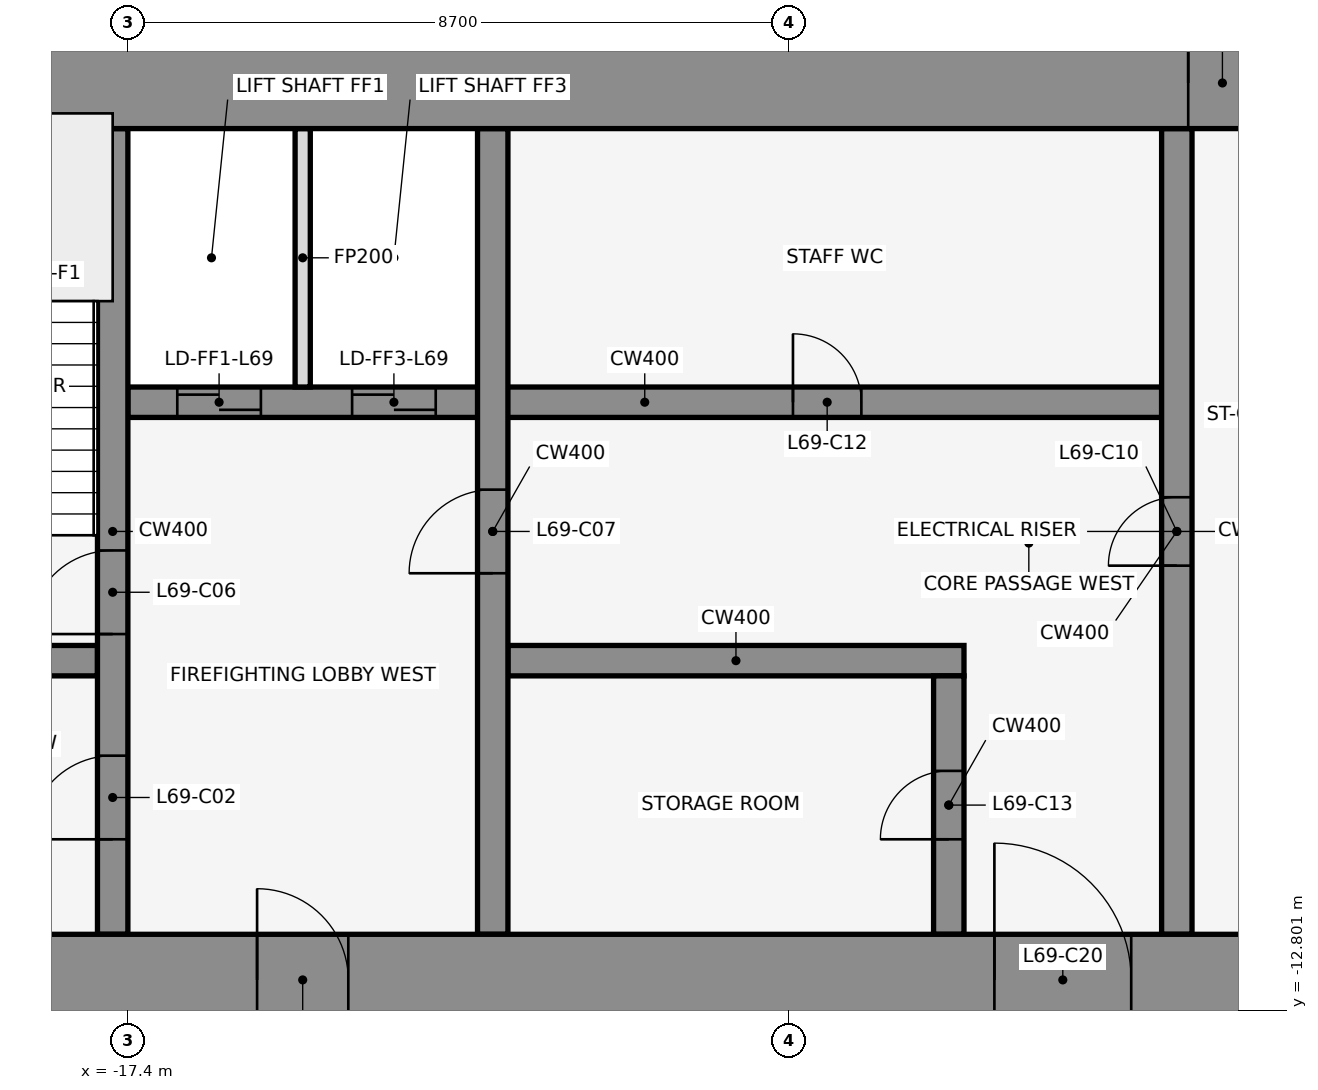
"""IFC4 building model, lengths in metres.
Left out: names, types, materials, properties, quantities, classifications, styles, units other than length and angle.
Written with IfcOpenShell. Run it as: python <this file> out.ifc"""

import sys

from ifc_helpers import new_model, si_unit, direction, frame, frame_2d, origin, place, context, subcontext, project, spatial, rectangle, extrude, element, fill, save


model = new_model("IFC4")
c1 = context("Model", 3, precision=1e-05, world=origin(), true_north=direction((0.0, 1.0)))
c2 = subcontext(c1, "Body", "Model", "MODEL_VIEW")
j1 = project(units=[si_unit("LENGTHUNIT", "METRE"), si_unit("PLANEANGLEUNIT", "RADIAN")], contexts=[c1])
p1 = place(None, origin())
s1 = spatial("IfcSite", under=j1, at=p1, CompositionType="ELEMENT")
p2 = place(p1, origin())
s2 = spatial("IfcBuilding", under=s1, at=p2, CompositionType="ELEMENT")
p3 = place(p2, frame((0.0, 0.0, 306.5)))
s3 = spatial("IfcBuildingStorey", under=s2, at=p3, CompositionType="ELEMENT", Elevation=306.5)
p4 = place(p3, frame((-14.599, 1.08, 0.0), z_axis=(0.0, 0.0, 1.0), x_axis=(-0.83981312244, -0.542875602121, 0.0)))
e1 = element("IfcWall", 1, at=p4, inside=s3, PredefinedType="STANDARD", context=c2, shape_type="SweptSolid", body=[
    extrude(rectangle(XDim=2.183, YDim=0.25, at=frame_2d((1.091, 0.0))), origin(), (0.0, 0.0, 1.0), 4.35),
])
p5 = place(p3, frame((-20.8, -8.2, 0.0), z_axis=(0.0, 0.0, 1.0), x_axis=(1.0, 0.0, 0.0)))
e2 = element("IfcWall", 2, at=p5, inside=s3, PredefinedType="SHEAR", context=c2, shape_type="SweptSolid", body=[
    extrude(rectangle(XDim=3.0, YDim=0.4, at=frame_2d((1.5, 0.0))), origin(), (0.0, 0.0, 1.0), 4.5),
])
p6 = place(p5, frame((0.85, 0.0, 0.0)))
e3 = element("IfcOpeningElement", 3, at=p6, cuts=e2, PredefinedType="OPENING", context=c2, shape_type="SweptSolid", body=[
    extrude(rectangle(XDim=1.2, YDim=2.1, at=frame_2d((0.6, 1.05))), frame((0.0, 0.212, 0.0), z_axis=(0.0, -1.0, 0.0), x_axis=(1.0, 0.0, 0.0)), (0.0, 0.0, 1.0), 0.424),
])
p7 = place(p3, frame((-12.4, -8.2, 0.0), z_axis=(0.0, 0.0, 1.0), x_axis=(1.0, 0.0, 0.0)))
e4 = element("IfcWall", 4, at=p7, inside=s3, PredefinedType="SHEAR", context=c2, shape_type="SweptSolid", body=[
    extrude(rectangle(XDim=6.0, YDim=0.4, at=frame_2d((3.0, 0.0))), origin(), (0.0, 0.0, 1.0), 4.5),
])
p8 = place(p3, frame((-17.4, -4.8, 0.0), z_axis=(0.0, 0.0, 1.0), x_axis=(1.0, 0.0, 0.0)))
e5 = element("IfcWall", 5, at=p8, inside=s3, PredefinedType="SHEAR", context=c2, shape_type="SweptSolid", body=[
    extrude(rectangle(XDim=13.6, YDim=0.4, at=frame_2d((6.8, 0.0))), origin(), (0.0, 0.0, 1.0), 4.5),
])
p9 = place(p8, frame((0.65, 0.0, 0.0)))
e6 = element("IfcOpeningElement", 6, at=p9, cuts=e5, PredefinedType="OPENING", context=c2, shape_type="SweptSolid", body=[
    extrude(rectangle(XDim=1.1, YDim=2.1, at=frame_2d((0.55, 1.05))), frame((0.0, 0.212, 0.0), z_axis=(0.0, -1.0, 0.0), x_axis=(1.0, 0.0, 0.0)), (0.0, 0.0, 1.0), 0.424),
])
p10 = place(p8, frame((2.95, 0.0, 0.0)))
e7 = element("IfcOpeningElement", 7, at=p10, cuts=e5, PredefinedType="OPENING", context=c2, shape_type="SweptSolid", body=[
    extrude(rectangle(XDim=1.1, YDim=2.1, at=frame_2d((0.55, 1.05))), frame((0.0, 0.212, 0.0), z_axis=(0.0, -1.0, 0.0), x_axis=(1.0, 0.0, 0.0)), (0.0, 0.0, 1.0), 0.424),
])
p11 = place(p8, frame((8.75, 0.0, 0.0)))
e8 = element("IfcOpeningElement", 8, at=p11, cuts=e5, PredefinedType="OPENING", context=c2, shape_type="SweptSolid", body=[
    extrude(rectangle(XDim=0.9, YDim=2.1, at=frame_2d((0.45, 1.05))), frame((0.0, 0.212, 0.0), z_axis=(0.0, -1.0, 0.0), x_axis=(1.0, 0.0, 0.0)), (0.0, 0.0, 1.0), 0.424),
])
p12 = place(p3, frame((-17.6, -11.8, 0.0), z_axis=(0.0, 0.0, 1.0), x_axis=(0.0, 1.0, 0.0)))
e9 = element("IfcWall", 9, at=p12, inside=s3, PredefinedType="SHEAR", context=c2, shape_type="SweptSolid", body=[
    extrude(rectangle(XDim=10.6, YDim=0.4, at=frame_2d((5.3, 0.0))), origin(), (0.0, 0.0, 1.0), 4.5),
])
p13 = place(p12, frame((1.25, 0.0, 0.0)))
e10 = element("IfcOpeningElement", 10, at=p13, cuts=e9, PredefinedType="OPENING", context=c2, shape_type="SweptSolid", body=[
    extrude(rectangle(XDim=1.1, YDim=2.1, at=frame_2d((0.55, 1.05))), frame((0.0, 0.212, 0.0), z_axis=(0.0, -1.0, 0.0), x_axis=(1.0, 0.0, 0.0)), (0.0, 0.0, 1.0), 0.424),
])
p14 = place(p12, frame((3.95, 0.0, 0.0)))
e11 = element("IfcOpeningElement", 11, at=p14, cuts=e9, PredefinedType="OPENING", context=c2, shape_type="SweptSolid", body=[
    extrude(rectangle(XDim=1.1, YDim=2.1, at=frame_2d((0.55, 1.05))), frame((0.0, 0.212, 0.0), z_axis=(0.0, -1.0, 0.0), x_axis=(1.0, 0.0, 0.0)), (0.0, 0.0, 1.0), 0.424),
])
p15 = place(p3, frame((-15.1, -4.6, 0.0), z_axis=(0.0, 0.0, 1.0), x_axis=(0.0, 1.0, 0.0)))
e12 = element("IfcWall", 12, at=p15, inside=s3, PredefinedType="PARTITIONING", context=c2, shape_type="SweptSolid", body=[
    extrude(rectangle(XDim=3.4, YDim=0.2, at=frame_2d((1.7, 0.0))), origin(), (0.0, 0.0, 1.0), 3.418),
])
p16 = place(p3, frame((-12.6, -11.8, 0.0), z_axis=(0.0, 0.0, 1.0), x_axis=(0.0, 1.0, 0.0)))
e13 = element("IfcWall", 13, at=p16, inside=s3, PredefinedType="SHEAR", context=c2, shape_type="SweptSolid", body=[
    extrude(rectangle(XDim=10.6, YDim=0.4, at=frame_2d((5.3, 0.0))), origin(), (0.0, 0.0, 1.0), 4.5),
])
p17 = place(p16, frame((4.75, 0.0, 0.0)))
e14 = element("IfcOpeningElement", 14, at=p17, cuts=e13, PredefinedType="OPENING", context=c2, shape_type="SweptSolid", body=[
    extrude(rectangle(XDim=1.1, YDim=2.1, at=frame_2d((0.55, 1.05))), frame((0.0, 0.212, 0.0), z_axis=(0.0, -1.0, 0.0), x_axis=(1.0, 0.0, 0.0)), (0.0, 0.0, 1.0), 0.424),
])
p18 = place(p3, frame((-6.6, -11.8, 0.0), z_axis=(0.0, 0.0, 1.0), x_axis=(0.0, 1.0, 0.0)))
e15 = element("IfcWall", 15, at=p18, inside=s3, PredefinedType="SHEAR", context=c2, shape_type="SweptSolid", body=[
    extrude(rectangle(XDim=3.4, YDim=0.4, at=frame_2d((1.7, 0.0))), origin(), (0.0, 0.0, 1.0), 4.5),
])
p19 = place(p18, frame((1.25, 0.0, 0.0)))
e16 = element("IfcOpeningElement", 16, at=p19, cuts=e15, PredefinedType="OPENING", context=c2, shape_type="SweptSolid", body=[
    extrude(rectangle(XDim=0.9, YDim=2.1, at=frame_2d((0.45, 1.05))), frame((0.0, 0.212, 0.0), z_axis=(0.0, -1.0, 0.0), x_axis=(1.0, 0.0, 0.0)), (0.0, 0.0, 1.0), 0.424),
])
p20 = place(p3, frame((-3.6, -11.8, 0.0), z_axis=(0.0, 0.0, 1.0), x_axis=(0.0, 1.0, 0.0)))
e17 = element("IfcWall", 17, at=p20, inside=s3, PredefinedType="SHEAR", context=c2, shape_type="SweptSolid", body=[
    extrude(rectangle(XDim=10.6, YDim=0.4, at=frame_2d((5.3, 0.0))), origin(), (0.0, 0.0, 1.0), 4.5),
])
p21 = place(p20, frame((4.85, 0.0, 0.0)))
e18 = element("IfcOpeningElement", 18, at=p21, cuts=e17, PredefinedType="OPENING", context=c2, shape_type="SweptSolid", body=[
    extrude(rectangle(XDim=0.9, YDim=2.1, at=frame_2d((0.45, 1.05))), frame((0.0, 0.212, 0.0), z_axis=(0.0, -1.0, 0.0), x_axis=(1.0, 0.0, 0.0)), (0.0, 0.0, 1.0), 0.424),
])
p22 = place(p3, frame((-22.0, -0.6, 0.0), z_axis=(0.0, 0.0, 1.0), x_axis=(1.0, 0.0, 0.0)))
e19 = element("IfcWall", 19, at=p22, inside=s3, PredefinedType="SHEAR", context=c2, shape_type="SweptSolid", body=[
    extrude(rectangle(XDim=44.0, YDim=1.2, at=frame_2d((22.0, 0.0))), origin(), (0.0, 0.0, 1.0), 4.5),
])
p23 = place(p22, frame((18.55, 0.0, 0.0)))
e20 = element("IfcOpeningElement", 20, at=p23, cuts=e19, PredefinedType="OPENING", context=c2, shape_type="SweptSolid", body=[
    extrude(rectangle(XDim=0.9, YDim=2.1, at=frame_2d((0.45, 1.05))), frame((0.0, 0.612, 0.0), z_axis=(0.0, -1.0, 0.0), x_axis=(1.0, 0.0, 0.0)), (0.0, 0.0, 1.0), 1.224),
])
p24 = place(p22, frame((24.55, 0.0, 0.0)))
e21 = element("IfcOpeningElement", 21, at=p24, cuts=e19, PredefinedType="OPENING", context=c2, shape_type="SweptSolid", body=[
    extrude(rectangle(XDim=0.9, YDim=2.1, at=frame_2d((0.45, 1.05))), frame((0.0, 0.612, 0.0), z_axis=(0.0, -1.0, 0.0), x_axis=(1.0, 0.0, 0.0)), (0.0, 0.0, 1.0), 1.224),
])
p25 = place(p3, frame((-22.0, -12.4, 0.0), z_axis=(0.0, 0.0, 1.0), x_axis=(1.0, 0.0, 0.0)))
e22 = element("IfcWall", 22, at=p25, inside=s3, PredefinedType="SHEAR", context=c2, shape_type="SweptSolid", body=[
    extrude(rectangle(XDim=44.0, YDim=1.2, at=frame_2d((22.0, 0.0))), origin(), (0.0, 0.0, 1.0), 4.5),
])
p26 = place(p25, frame((2.2, 0.0, 0.0)))
e23 = element("IfcOpeningElement", 23, at=p26, cuts=e22, PredefinedType="OPENING", context=c2, shape_type="SweptSolid", body=[
    extrude(rectangle(XDim=1.2, YDim=2.1, at=frame_2d((0.6, 1.05))), frame((0.0, 0.612, 0.0), z_axis=(0.0, -1.0, 0.0), x_axis=(1.0, 0.0, 0.0)), (0.0, 0.0, 1.0), 1.224),
])
p27 = place(p25, frame((21.4, 0.0, 0.0)))
e24 = element("IfcOpeningElement", 24, at=p27, cuts=e22, PredefinedType="OPENING", context=c2, shape_type="SweptSolid", body=[
    extrude(rectangle(XDim=1.2, YDim=2.1, at=frame_2d((0.6, 1.05))), frame((0.0, 0.612, 0.0), z_axis=(0.0, -1.0, 0.0), x_axis=(1.0, 0.0, 0.0)), (0.0, 0.0, 1.0), 1.224),
])
p28 = place(p25, frame((40.6, 0.0, 0.0)))
e25 = element("IfcOpeningElement", 25, at=p28, cuts=e22, PredefinedType="OPENING", context=c2, shape_type="SweptSolid", body=[
    extrude(rectangle(XDim=1.2, YDim=2.1, at=frame_2d((0.6, 1.05))), frame((0.0, 0.612, 0.0), z_axis=(0.0, -1.0, 0.0), x_axis=(1.0, 0.0, 0.0)), (0.0, 0.0, 1.0), 1.224),
])
p29 = place(p25, frame((16.0, 0.0, 0.0)))
e26 = element("IfcOpeningElement", 26, at=p29, cuts=e22, PredefinedType="OPENING", context=c2, shape_type="SweptSolid", body=[
    extrude(rectangle(XDim=1.8, YDim=2.1, at=frame_2d((0.9, 1.05))), frame((0.0, 0.612, 0.0), z_axis=(0.0, -1.0, 0.0), x_axis=(1.0, 0.0, 0.0)), (0.0, 0.0, 1.0), 1.224),
])
p30 = place(p25, frame((6.3, 0.0, 0.0)))
e27 = element("IfcOpeningElement", 27, at=p30, cuts=e22, PredefinedType="OPENING", context=c2, shape_type="SweptSolid", body=[
    extrude(rectangle(XDim=1.2, YDim=2.1, at=frame_2d((0.6, 1.05))), frame((0.0, 0.612, 0.0), z_axis=(0.0, -1.0, 0.0), x_axis=(1.0, 0.0, 0.0)), (0.0, 0.0, 1.0), 1.224),
])
p31 = place(p25, frame((26.2, 0.0, 0.0)))
e28 = element("IfcOpeningElement", 28, at=p31, cuts=e22, PredefinedType="OPENING", context=c2, shape_type="SweptSolid", body=[
    extrude(rectangle(XDim=1.8, YDim=2.1, at=frame_2d((0.9, 1.05))), frame((0.0, 0.612, 0.0), z_axis=(0.0, -1.0, 0.0), x_axis=(1.0, 0.0, 0.0)), (0.0, 0.0, 1.0), 1.224),
])
p32 = place(p25, frame((36.5, 0.0, 0.0)))
e29 = element("IfcOpeningElement", 29, at=p32, cuts=e22, PredefinedType="OPENING", context=c2, shape_type="SweptSolid", body=[
    extrude(rectangle(XDim=1.2, YDim=2.1, at=frame_2d((0.6, 1.05))), frame((0.0, 0.612, 0.0), z_axis=(0.0, -1.0, 0.0), x_axis=(1.0, 0.0, 0.0)), (0.0, 0.0, 1.0), 1.224),
])
p33 = place(p13, frame((1.1, 0.0, 0.0), z_axis=(0.0, 0.0, 1.0), x_axis=(-1.0, 0.0, 0.0)))
e30 = element("IfcDoor", 30, at=p33, inside=s3, OperationType="SINGLE_SWING_LEFT", PredefinedType="DOOR", context=c2, shape_type="SweptSolid", body=[
    extrude(rectangle(XDim=1.1, YDim=2.1, at=frame_2d((0.55, 1.05))), frame((0.0, 0.025, 0.0), z_axis=(0.0, -1.0, 0.0), x_axis=(1.0, 0.0, 0.0)), (0.0, 0.0, 1.0), 0.05),
])
fill(e10, e30)
p34 = place(p9, origin())
e31 = element("IfcDoor", 31, at=p34, inside=s3, OperationType="DOUBLE_DOOR_SLIDING", PredefinedType="DOOR", context=c2, shape_type="SweptSolid", body=[
    extrude(rectangle(XDim=1.1, YDim=2.1, at=frame_2d((0.55, 1.05))), frame((0.0, 0.025, 0.0), z_axis=(0.0, -1.0, 0.0), x_axis=(1.0, 0.0, 0.0)), (0.0, 0.0, 1.0), 0.05),
])
fill(e6, e31)
p35 = place(p10, origin())
e32 = element("IfcDoor", 32, at=p35, inside=s3, OperationType="DOUBLE_DOOR_SLIDING", PredefinedType="DOOR", context=c2, shape_type="SweptSolid", body=[
    extrude(rectangle(XDim=1.1, YDim=2.1, at=frame_2d((0.55, 1.05))), frame((0.0, 0.025, 0.0), z_axis=(0.0, -1.0, 0.0), x_axis=(1.0, 0.0, 0.0)), (0.0, 0.0, 1.0), 0.05),
])
fill(e7, e32)
p36 = place(p14, frame((1.1, 0.0, 0.0), z_axis=(0.0, 0.0, 1.0), x_axis=(-1.0, 0.0, 0.0)))
e33 = element("IfcDoor", 33, at=p36, inside=s3, OperationType="SINGLE_SWING_LEFT", PredefinedType="DOOR", context=c2, shape_type="SweptSolid", body=[
    extrude(rectangle(XDim=1.1, YDim=2.1, at=frame_2d((0.55, 1.05))), frame((0.0, 0.025, 0.0), z_axis=(0.0, -1.0, 0.0), x_axis=(1.0, 0.0, 0.0)), (0.0, 0.0, 1.0), 0.05),
])
fill(e11, e33)
p37 = place(p17, origin())
e34 = element("IfcDoor", 34, at=p37, inside=s3, OperationType="SINGLE_SWING_LEFT", PredefinedType="DOOR", context=c2, shape_type="SweptSolid", body=[
    extrude(rectangle(XDim=1.1, YDim=2.1, at=frame_2d((0.55, 1.05))), frame((0.0, 0.025, 0.0), z_axis=(0.0, -1.0, 0.0), x_axis=(1.0, 0.0, 0.0)), (0.0, 0.0, 1.0), 0.05),
])
fill(e14, e34)
p38 = place(p21, frame((0.9, 0.0, 0.0), z_axis=(0.0, 0.0, 1.0), x_axis=(-1.0, 0.0, 0.0)))
e35 = element("IfcDoor", 35, at=p38, inside=s3, OperationType="SINGLE_SWING_LEFT", PredefinedType="DOOR", context=c2, shape_type="SweptSolid", body=[
    extrude(rectangle(XDim=0.9, YDim=2.1, at=frame_2d((0.45, 1.05))), frame((0.0, 0.025, 0.0), z_axis=(0.0, -1.0, 0.0), x_axis=(1.0, 0.0, 0.0)), (0.0, 0.0, 1.0), 0.05),
])
fill(e18, e35)
p39 = place(p11, origin())
e36 = element("IfcDoor", 36, at=p39, inside=s3, OperationType="SINGLE_SWING_RIGHT", PredefinedType="DOOR", context=c2, shape_type="SweptSolid", body=[
    extrude(rectangle(XDim=0.9, YDim=2.1, at=frame_2d((0.45, 1.05))), frame((0.0, 0.025, 0.0), z_axis=(0.0, -1.0, 0.0), x_axis=(1.0, 0.0, 0.0)), (0.0, 0.0, 1.0), 0.05),
])
fill(e8, e36)
p40 = place(p19, origin())
e37 = element("IfcDoor", 37, at=p40, inside=s3, OperationType="SINGLE_SWING_LEFT", PredefinedType="DOOR", context=c2, shape_type="SweptSolid", body=[
    extrude(rectangle(XDim=0.9, YDim=2.1, at=frame_2d((0.45, 1.05))), frame((0.0, 0.025, 0.0), z_axis=(0.0, -1.0, 0.0), x_axis=(1.0, 0.0, 0.0)), (0.0, 0.0, 1.0), 0.05),
])
fill(e16, e37)
p41 = place(p23, origin())
e38 = element("IfcDoor", 38, at=p41, inside=s3, OperationType="SINGLE_SWING_LEFT", PredefinedType="DOOR", context=c2, shape_type="SweptSolid", body=[
    extrude(rectangle(XDim=0.9, YDim=2.1, at=frame_2d((0.45, 1.05))), frame((0.0, 0.025, 0.0), z_axis=(0.0, -1.0, 0.0), x_axis=(1.0, 0.0, 0.0)), (0.0, 0.0, 1.0), 0.05),
])
fill(e20, e38)
p42 = place(p29, origin())
e39 = element("IfcDoor", 39, at=p42, inside=s3, OperationType="SINGLE_SWING_LEFT", PredefinedType="DOOR", context=c2, shape_type="SweptSolid", body=[
    extrude(rectangle(XDim=1.8, YDim=2.1, at=frame_2d((0.9, 1.05))), frame((0.0, 0.025, 0.0), z_axis=(0.0, -1.0, 0.0), x_axis=(1.0, 0.0, 0.0)), (0.0, 0.0, 1.0), 0.05),
])
fill(e26, e39)
p43 = place(p30, frame((1.2, 0.0, 0.0), z_axis=(0.0, 0.0, 1.0), x_axis=(-1.0, 0.0, 0.0)))
e40 = element("IfcDoor", 40, at=p43, inside=s3, OperationType="SINGLE_SWING_RIGHT", PredefinedType="DOOR", context=c2, shape_type="SweptSolid", body=[
    extrude(rectangle(XDim=1.2, YDim=2.1, at=frame_2d((0.6, 1.05))), frame((0.0, 0.025, 0.0), z_axis=(0.0, -1.0, 0.0), x_axis=(1.0, 0.0, 0.0)), (0.0, 0.0, 1.0), 0.05),
])
fill(e27, e40)
save(model, sys.argv[1])
